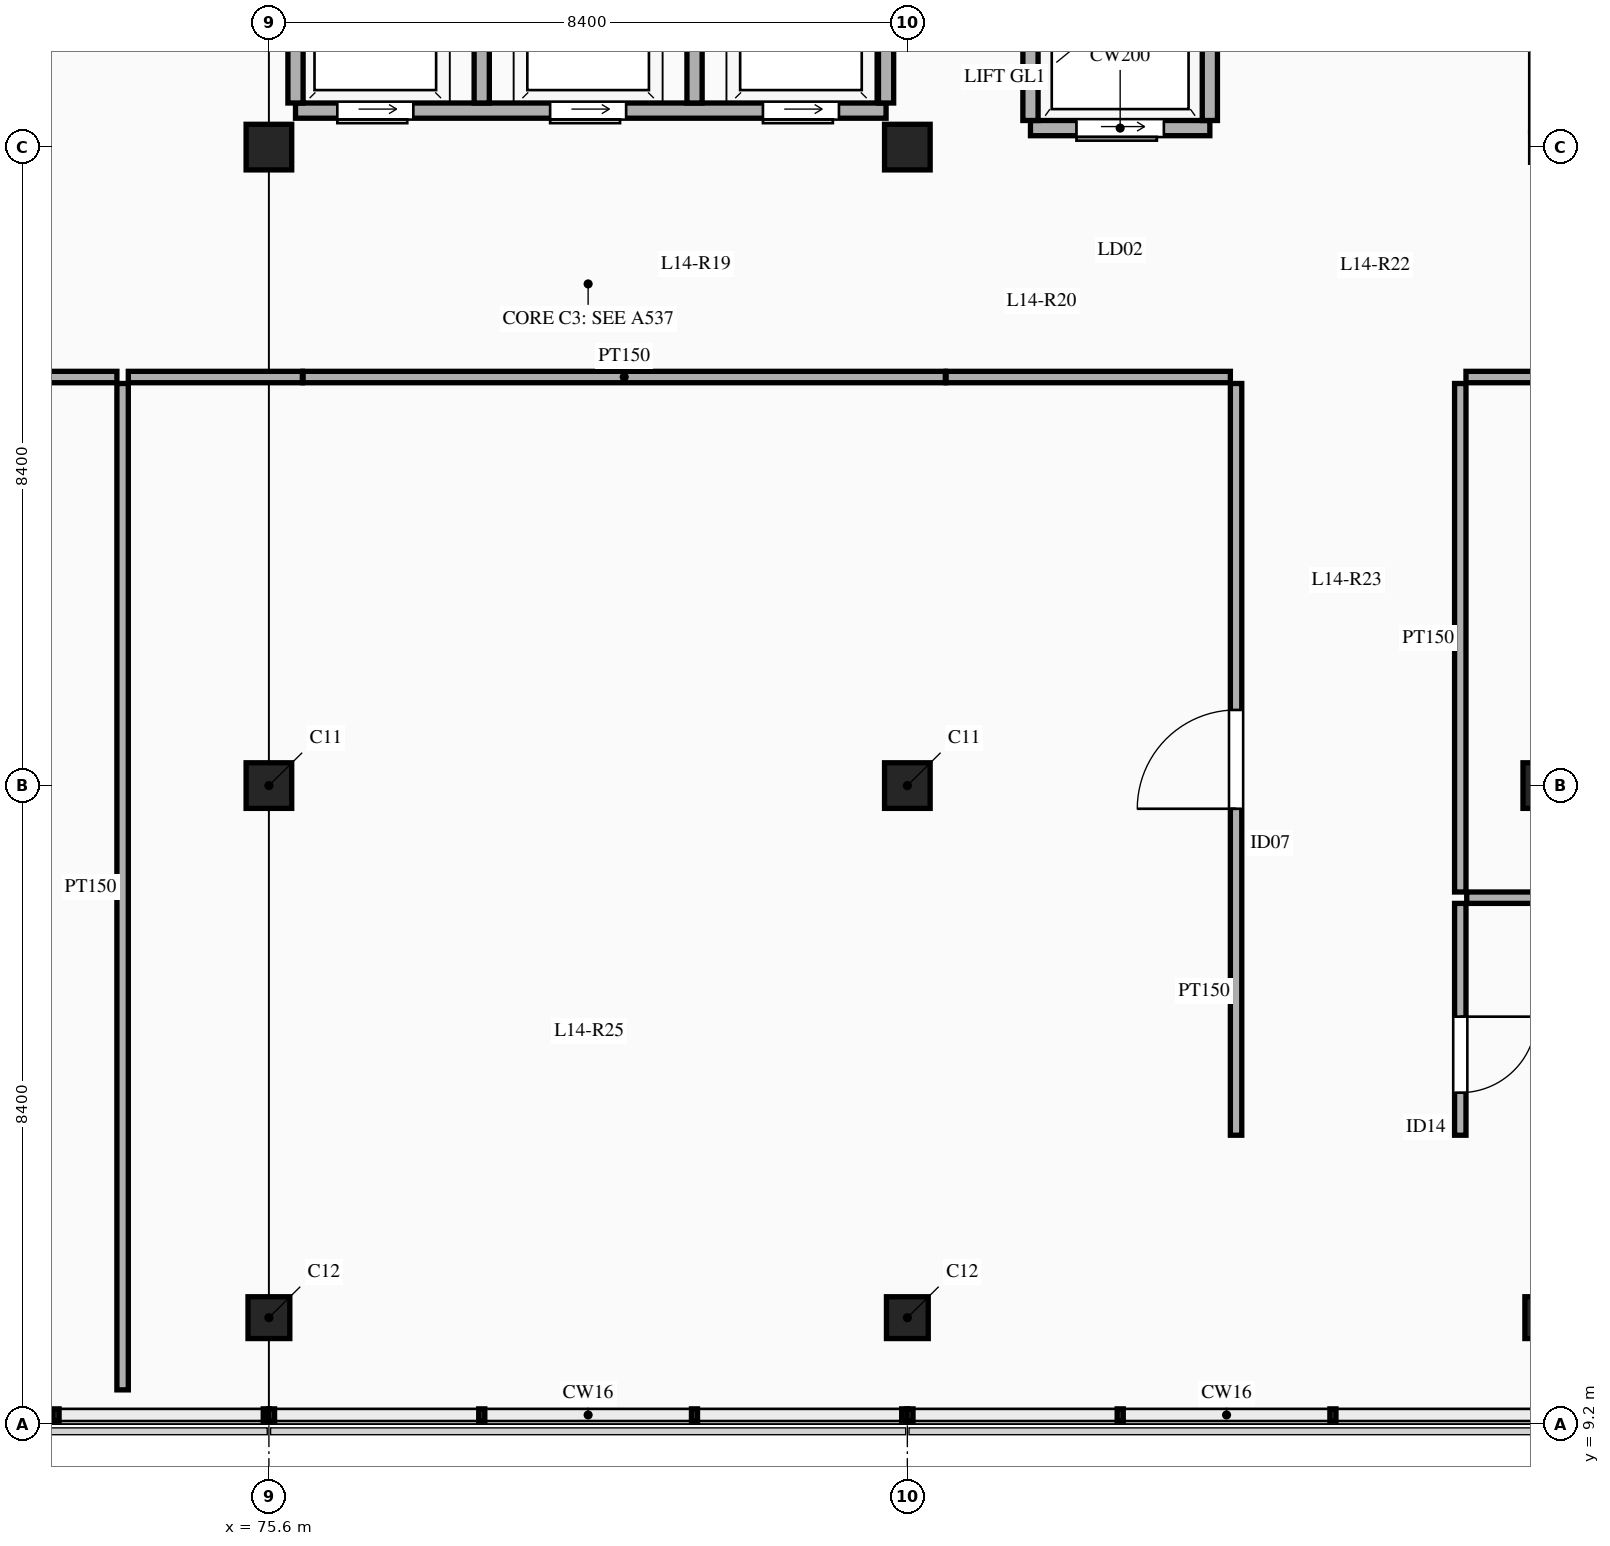
"""IFC4 building model, lengths in metres.
Left out: names, types, materials, properties, quantities, classifications, styles, units other than length and angle.
Written with IfcOpenShell. Run it as: python <this file> out.ifc"""

import sys

from ifc_helpers import new_model, si_unit, direction, frame, frame_2d, origin, origin_2d, place, context, subcontext, project, spatial, rectangle, extrude, element, fill, save


model = new_model("IFC4")
c1 = context("Model", 3, precision=1e-05, world=origin(), true_north=direction((0.0, 1.0)))
c2 = subcontext(c1, "Body", "Model", "MODEL_VIEW")
j1 = project(units=[si_unit("LENGTHUNIT", "METRE"), si_unit("PLANEANGLEUNIT", "RADIAN")], contexts=[c1])
p1 = place(None, origin())
s1 = spatial("IfcSite", under=j1, at=p1, CompositionType="ELEMENT")
p2 = place(p1, origin())
s2 = spatial("IfcBuilding", under=s1, at=p2, CompositionType="ELEMENT")
p3 = place(p2, frame((0.0, 0.0, 64.5)))
s3 = spatial("IfcBuildingStorey", under=s2, at=p3, CompositionType="ELEMENT", Elevation=64.5)
p4 = place(p3, frame((75.6, 10.6, 0.0), z_axis=(0.0, 0.0, 1.0), x_axis=(1.0, 0.0, 0.0)))
e1 = element("IfcColumn", 1, at=p4, inside=s3, PredefinedType="COLUMN", context=c2, shape_type="SweptSolid", body=[
    extrude(rectangle(XDim=0.55, YDim=0.55, at=origin_2d()), origin(), (0.0, 0.0, 1.0), 4.5),
])
for number, where, z_axis, x_axis in (
    (2, (75.6, 17.6, 0.0), (0.0, 0.0, 1.0), (1.0, 0.0, 0.0)),
    (3, (75.6, 26.0, 0.0), (0.0, 0.0, 1.0), (1.0, 0.0, 0.0)),
):
    element("IfcColumn", number, at=place(p3, frame(where, z_axis=z_axis, x_axis=x_axis)), inside=s3, PredefinedType="COLUMN", context=c2, shape_type="SweptSolid", body=[
        extrude(rectangle(XDim=0.6, YDim=0.6, at=origin_2d()), origin(), (0.0, 0.0, 1.0), 4.5),
    ])
p5 = place(p3, frame((84.0, 10.6, 0.0), z_axis=(0.0, 0.0, 1.0), x_axis=(1.0, 0.0, 0.0)))
e4 = element("IfcColumn", 4, at=p5, inside=s3, PredefinedType="COLUMN", context=c2, shape_type="SweptSolid", body=[
    extrude(rectangle(XDim=0.55, YDim=0.55, at=origin_2d()), origin(), (0.0, 0.0, 1.0), 4.5),
])
for number, where, z_axis, x_axis in (
    (5, (84.0, 17.6, 0.0), (0.0, 0.0, 1.0), (1.0, 0.0, 0.0)),
    (6, (84.0, 26.0, 0.0), (0.0, 0.0, 1.0), (1.0, 0.0, 0.0)),
):
    element("IfcColumn", number, at=place(p3, frame(where, z_axis=z_axis, x_axis=x_axis)), inside=s3, PredefinedType="COLUMN", context=c2, shape_type="SweptSolid", body=[
        extrude(rectangle(XDim=0.6, YDim=0.6, at=origin_2d()), origin(), (0.0, 0.0, 1.0), 4.5),
    ])
p6 = place(p3, frame((92.4, 10.6, 0.0), z_axis=(0.0, 0.0, 1.0), x_axis=(1.0, 0.0, 0.0)))
e7 = element("IfcColumn", 7, at=p6, inside=s3, PredefinedType="COLUMN", context=c2, shape_type="SweptSolid", body=[
    extrude(rectangle(XDim=0.55, YDim=0.55, at=origin_2d()), origin(), (0.0, 0.0, 1.0), 4.5),
])
p7 = place(p3, frame((92.4, 17.6, 0.0), z_axis=(0.0, 0.0, 1.0), x_axis=(1.0, 0.0, 0.0)))
e8 = element("IfcColumn", 8, at=p7, inside=s3, PredefinedType="COLUMN", context=c2, shape_type="SweptSolid", body=[
    extrude(rectangle(XDim=0.6, YDim=0.6, at=origin_2d()), origin(), (0.0, 0.0, 1.0), 4.5),
])
p8 = place(p3, frame((75.95, 26.48, 0.0), z_axis=(0.0, 0.0, 1.0), x_axis=(1.0, 0.0, 0.0)))
e9 = element("IfcWall", 9, at=p8, inside=s3, PredefinedType="SOLIDWALL", context=c2, shape_type="SweptSolid", body=[
    extrude(rectangle(XDim=7.77, YDim=0.2, at=frame_2d((3.885, 0.0))), origin(), (0.0, 0.0, 1.0), 4.3),
])
p9 = place(p8, frame((0.55, 0.0, 0.0)))
e10 = element("IfcOpeningElement", 10, at=p9, cuts=e9, PredefinedType="OPENING", context=c2, shape_type="SweptSolid", body=[
    extrude(rectangle(XDim=1.0, YDim=2.15, at=frame_2d((0.5, 1.075))), frame((0.0, 0.11, 0.0), z_axis=(0.0, -1.0, 0.0), x_axis=(1.0, 0.0, 0.0)), (0.0, 0.0, 1.0), 0.22),
])
p10 = place(p8, frame((3.35, 0.0, 0.0)))
e11 = element("IfcOpeningElement", 11, at=p10, cuts=e9, PredefinedType="OPENING", context=c2, shape_type="SweptSolid", body=[
    extrude(rectangle(XDim=1.0, YDim=2.15, at=frame_2d((0.5, 1.075))), frame((0.0, 0.11, 0.0), z_axis=(0.0, -1.0, 0.0), x_axis=(1.0, 0.0, 0.0)), (0.0, 0.0, 1.0), 0.22),
])
p11 = place(p8, frame((6.15, 0.0, 0.0)))
e12 = element("IfcOpeningElement", 12, at=p11, cuts=e9, PredefinedType="OPENING", context=c2, shape_type="SweptSolid", body=[
    extrude(rectangle(XDim=1.0, YDim=2.15, at=frame_2d((0.5, 1.075))), frame((0.0, 0.11, 0.0), z_axis=(0.0, -1.0, 0.0), x_axis=(1.0, 0.0, 0.0)), (0.0, 0.0, 1.0), 0.22),
])
for number, where, z_axis, x_axis in (
    (13, (75.95, 26.58, 0.0), (0.0, 0.0, 1.0), (0.0, 1.0, 0.0)),
    (14, (78.4, 26.58, 0.0), (0.0, 0.0, 1.0), (0.0, 1.0, 0.0)),
    (15, (81.2, 26.58, 0.0), (0.0, 0.0, 1.0), (0.0, 1.0, 0.0)),
):
    element("IfcWall", number, at=place(p3, frame(where, z_axis=z_axis, x_axis=x_axis)), inside=s3, PredefinedType="SOLIDWALL", context=c2, shape_type="SweptSolid", body=[
        extrude(rectangle(XDim=1.84, YDim=0.2, at=frame_2d((0.92, 0.0))), origin(), (0.0, 0.0, 1.0), 4.3),
    ])
p12 = place(p3, frame((83.72, 26.58, 0.0), z_axis=(0.0, 0.0, 1.0), x_axis=(0.0, 1.0, 0.0)))
e16 = element("IfcWall", 16, at=p12, inside=s3, PredefinedType="SOLIDWALL", context=c2, shape_type="SweptSolid", body=[
    extrude(rectangle(XDim=1.84, YDim=0.2, at=frame_2d((0.92, 0.0))), origin(), (0.0, 0.0, 1.0), 3.93),
])
p13 = place(p3, frame((85.62, 26.25, 0.0), z_axis=(0.0, 0.0, 1.0), x_axis=(1.0, 0.0, 0.0)))
e17 = element("IfcWall", 17, at=p13, inside=s3, PredefinedType="SOLIDWALL", context=c2, shape_type="SweptSolid", body=[
    extrude(rectangle(XDim=2.36, YDim=0.2, at=frame_2d((1.18, 0.0))), origin(), (0.0, 0.0, 1.0), 3.88),
])
p14 = place(p13, frame((0.605, 0.0, 0.0)))
e18 = element("IfcOpeningElement", 18, at=p14, cuts=e17, PredefinedType="OPENING", context=c2, shape_type="SweptSolid", body=[
    extrude(rectangle(XDim=1.15, YDim=2.2, at=frame_2d((0.575, 1.1))), frame((0.0, 0.11, 0.0), z_axis=(0.0, -1.0, 0.0), x_axis=(1.0, 0.0, 0.0)), (0.0, 0.0, 1.0), 0.22),
])
p15 = place(p3, frame((85.62, 26.35, 0.0), z_axis=(0.0, 0.0, 1.0), x_axis=(0.0, 1.0, 0.0)))
e19 = element("IfcWall", 19, at=p15, inside=s3, PredefinedType="SOLIDWALL", context=c2, shape_type="SweptSolid", body=[
    extrude(rectangle(XDim=2.9, YDim=0.2, at=frame_2d((1.45, 0.0))), origin(), (0.0, 0.0, 1.0), 4.3),
])
p16 = place(p3, frame((87.98, 26.35, 0.0), z_axis=(0.0, 0.0, 1.0), x_axis=(0.0, 1.0, 0.0)))
e20 = element("IfcWall", 20, at=p16, inside=s3, PredefinedType="SOLIDWALL", context=c2, shape_type="SweptSolid", body=[
    extrude(rectangle(XDim=2.9, YDim=0.2, at=frame_2d((1.45, 0.0))), origin(), (0.0, 0.0, 1.0), 4.03),
])
p17 = place(p3, frame((76.05, 22.975, 0.0), z_axis=(0.0, 0.0, 1.0), x_axis=(1.0, 0.0, 0.0)))
e21 = element("IfcWall", 21, at=p17, inside=s3, PredefinedType="PARTITIONING", context=c2, shape_type="SweptSolid", body=[
    extrude(rectangle(XDim=8.45, YDim=0.15, at=frame_2d((4.225, 0.0))), origin(), (0.0, 0.0, 1.0), 3.45),
])
p18 = place(p3, frame((84.51, 22.975, 0.0), z_axis=(0.0, 0.0, 1.0), x_axis=(1.0, 0.0, 0.0)))
e22 = element("IfcWall", 22, at=p18, inside=s3, PredefinedType="PARTITIONING", context=c2, shape_type="SweptSolid", body=[
    extrude(rectangle(XDim=3.74, YDim=0.15, at=frame_2d((1.87, 0.0))), origin(), (0.0, 0.0, 1.0), 3.45),
])
p19 = place(p3, frame((59.25, 22.975, 0.0), z_axis=(0.0, 0.0, 1.0), x_axis=(1.0, 0.0, 0.0)))
e23 = element("IfcWall", 23, at=p19, inside=s3, PredefinedType="PARTITIONING", context=c2, shape_type="SweptSolid", body=[
    extrude(rectangle(XDim=14.35, YDim=0.15, at=frame_2d((7.175, 0.0))), origin(), (0.0, 0.0, 1.0), 3.45),
])
p20 = place(p19, frame((5.33, 0.0, 0.0)))
e24 = element("IfcOpeningElement", 24, at=p20, cuts=e23, PredefinedType="OPENING", context=c2, shape_type="SweptSolid", body=[
    extrude(rectangle(XDim=1.3, YDim=2.25, at=frame_2d((0.65, 1.125))), frame((0.0, 0.085, 0.0), z_axis=(0.0, -1.0, 0.0), x_axis=(1.0, 0.0, 0.0)), (0.0, 0.0, 1.0), 0.17),
])
p21 = place(p3, frame((73.75, 22.975, 0.0), z_axis=(0.0, 0.0, 1.0), x_axis=(1.0, 0.0, 0.0)))
e25 = element("IfcWall", 25, at=p21, inside=s3, PredefinedType="PARTITIONING", context=c2, shape_type="SweptSolid", body=[
    extrude(rectangle(XDim=2.29, YDim=0.15, at=frame_2d((1.145, 0.0))), origin(), (0.0, 0.0, 1.0), 3.45),
])
p22 = place(p3, frame((91.35, 22.975, 0.0), z_axis=(0.0, 0.0, 1.0), x_axis=(1.0, 0.0, 0.0)))
e26 = element("IfcWall", 26, at=p22, inside=s3, PredefinedType="PARTITIONING", context=c2, shape_type="SweptSolid", body=[
    extrude(rectangle(XDim=9.0, YDim=0.15, at=frame_2d((4.5, 0.0))), origin(), (0.0, 0.0, 1.0), 3.45),
])
p23 = place(p22, frame((4.0, 0.0, 0.0)))
e27 = element("IfcOpeningElement", 27, at=p23, cuts=e26, PredefinedType="OPENING", context=c2, shape_type="SweptSolid", body=[
    extrude(rectangle(XDim=1.0, YDim=2.15, at=frame_2d((0.5, 1.075))), frame((0.0, 0.085, 0.0), z_axis=(0.0, -1.0, 0.0), x_axis=(1.0, 0.0, 0.0)), (0.0, 0.0, 1.0), 0.17),
])
p24 = place(p3, frame((88.325, 13.0, 0.0), z_axis=(0.0, 0.0, 1.0), x_axis=(0.0, 1.0, 0.0)))
e28 = element("IfcWall", 28, at=p24, inside=s3, PredefinedType="PARTITIONING", context=c2, shape_type="SweptSolid", body=[
    extrude(rectangle(XDim=9.89, YDim=0.15, at=frame_2d((4.945, 0.0))), origin(), (0.0, 0.0, 1.0), 3.45),
])
p25 = place(p24, frame((4.295, 0.0, 0.0)))
e29 = element("IfcOpeningElement", 29, at=p25, cuts=e28, PredefinedType="OPENING", context=c2, shape_type="SweptSolid", body=[
    extrude(rectangle(XDim=1.3, YDim=2.25, at=frame_2d((0.65, 1.125))), frame((0.0, 0.085, 0.0), z_axis=(0.0, -1.0, 0.0), x_axis=(1.0, 0.0, 0.0)), (0.0, 0.0, 1.0), 0.17),
])
p26 = place(p3, frame((91.275, 16.2, 0.0), z_axis=(0.0, 0.0, 1.0), x_axis=(0.0, 1.0, 0.0)))
e30 = element("IfcWall", 30, at=p26, inside=s3, PredefinedType="PARTITIONING", context=c2, shape_type="SweptSolid", body=[
    extrude(rectangle(XDim=6.69, YDim=0.15, at=frame_2d((3.345, 0.0))), origin(), (0.0, 0.0, 1.0), 3.45),
])
p27 = place(p3, frame((91.275, 13.0, 0.0), z_axis=(0.0, 0.0, 1.0), x_axis=(0.0, 1.0, 0.0)))
e31 = element("IfcWall", 31, at=p27, inside=s3, PredefinedType="PARTITIONING", context=c2, shape_type="SweptSolid", body=[
    extrude(rectangle(XDim=3.05, YDim=0.15, at=frame_2d((1.525, 0.0))), origin(), (0.0, 0.0, 1.0), 3.45),
])
p28 = place(p27, frame((0.56, 0.0, 0.0)))
e32 = element("IfcOpeningElement", 32, at=p28, cuts=e31, PredefinedType="OPENING", context=c2, shape_type="SweptSolid", body=[
    extrude(rectangle(XDim=1.0, YDim=2.15, at=frame_2d((0.5, 1.075))), frame((0.0, 0.085, 0.0), z_axis=(0.0, -1.0, 0.0), x_axis=(1.0, 0.0, 0.0)), (0.0, 0.0, 1.0), 0.17),
])
p29 = place(p3, frame((73.675, 9.65, 0.0), z_axis=(0.0, 0.0, 1.0), x_axis=(0.0, 1.0, 0.0)))
e33 = element("IfcWall", 33, at=p29, inside=s3, PredefinedType="PARTITIONING", context=c2, shape_type="SweptSolid", body=[
    extrude(rectangle(XDim=13.24, YDim=0.15, at=frame_2d((6.62, 0.0))), origin(), (0.0, 0.0, 1.0), 3.45),
])
p30 = place(p3, frame((91.36, 16.125, 0.0), z_axis=(0.0, 0.0, 1.0), x_axis=(1.0, 0.0, 0.0)))
e34 = element("IfcWall", 34, at=p30, inside=s3, PredefinedType="PARTITIONING", context=c2, shape_type="SweptSolid", body=[
    extrude(rectangle(XDim=8.99, YDim=0.15, at=frame_2d((4.495, 0.0))), origin(), (0.0, 0.0, 1.0), 3.45),
])
p31 = place(p9, frame((1.0, 0.0, 0.0), z_axis=(0.0, 0.0, 1.0), x_axis=(-1.0, 0.0, 0.0)))
e35 = element("IfcDoor", 35, at=p31, inside=s3, OperationType="SLIDING_TO_LEFT", PredefinedType="DOOR", context=c2, shape_type="SweptSolid", body=[
    extrude(rectangle(XDim=1.0, YDim=2.15, at=frame_2d((0.5, 1.075))), frame((0.0, 0.025, 0.0), z_axis=(0.0, -1.0, 0.0), x_axis=(1.0, 0.0, 0.0)), (0.0, 0.0, 1.0), 0.05),
])
fill(e10, e35)
p32 = place(p10, frame((1.0, 0.0, 0.0), z_axis=(0.0, 0.0, 1.0), x_axis=(-1.0, 0.0, 0.0)))
e36 = element("IfcDoor", 36, at=p32, inside=s3, OperationType="SLIDING_TO_LEFT", PredefinedType="DOOR", context=c2, shape_type="SweptSolid", body=[
    extrude(rectangle(XDim=1.0, YDim=2.15, at=frame_2d((0.5, 1.075))), frame((0.0, 0.025, 0.0), z_axis=(0.0, -1.0, 0.0), x_axis=(1.0, 0.0, 0.0)), (0.0, 0.0, 1.0), 0.05),
])
fill(e11, e36)
p33 = place(p11, frame((1.0, 0.0, 0.0), z_axis=(0.0, 0.0, 1.0), x_axis=(-1.0, 0.0, 0.0)))
e37 = element("IfcDoor", 37, at=p33, inside=s3, OperationType="SLIDING_TO_LEFT", PredefinedType="DOOR", context=c2, shape_type="SweptSolid", body=[
    extrude(rectangle(XDim=1.0, YDim=2.15, at=frame_2d((0.5, 1.075))), frame((0.0, 0.025, 0.0), z_axis=(0.0, -1.0, 0.0), x_axis=(1.0, 0.0, 0.0)), (0.0, 0.0, 1.0), 0.05),
])
fill(e12, e37)
p34 = place(p14, frame((1.15, 0.0, 0.0), z_axis=(0.0, 0.0, 1.0), x_axis=(-1.0, 0.0, 0.0)))
e38 = element("IfcDoor", 38, at=p34, inside=s3, OperationType="SLIDING_TO_LEFT", PredefinedType="DOOR", context=c2, shape_type="SweptSolid", body=[
    extrude(rectangle(XDim=1.15, YDim=2.2, at=frame_2d((0.575, 1.1))), frame((0.0, 0.025, 0.0), z_axis=(0.0, -1.0, 0.0), x_axis=(1.0, 0.0, 0.0)), (0.0, 0.0, 1.0), 0.05),
])
fill(e18, e38)
p35 = place(p25, origin())
e39 = element("IfcDoor", 39, at=p35, inside=s3, OperationType="SINGLE_SWING_LEFT", PredefinedType="DOOR", context=c2, shape_type="SweptSolid", body=[
    extrude(rectangle(XDim=1.3, YDim=2.25, at=frame_2d((0.65, 1.125))), frame((0.0, 0.025, 0.0), z_axis=(0.0, -1.0, 0.0), x_axis=(1.0, 0.0, 0.0)), (0.0, 0.0, 1.0), 0.05),
])
fill(e29, e39)
p36 = place(p28, frame((1.0, 0.0, 0.0), z_axis=(0.0, 0.0, 1.0), x_axis=(-1.0, 0.0, 0.0)))
e40 = element("IfcDoor", 40, at=p36, inside=s3, OperationType="SINGLE_SWING_LEFT", PredefinedType="DOOR", context=c2, shape_type="SweptSolid", body=[
    extrude(rectangle(XDim=1.0, YDim=2.15, at=frame_2d((0.5, 1.075))), frame((0.0, 0.025, 0.0), z_axis=(0.0, -1.0, 0.0), x_axis=(1.0, 0.0, 0.0)), (0.0, 0.0, 1.0), 0.05),
])
fill(e32, e40)
save(model, sys.argv[1])
